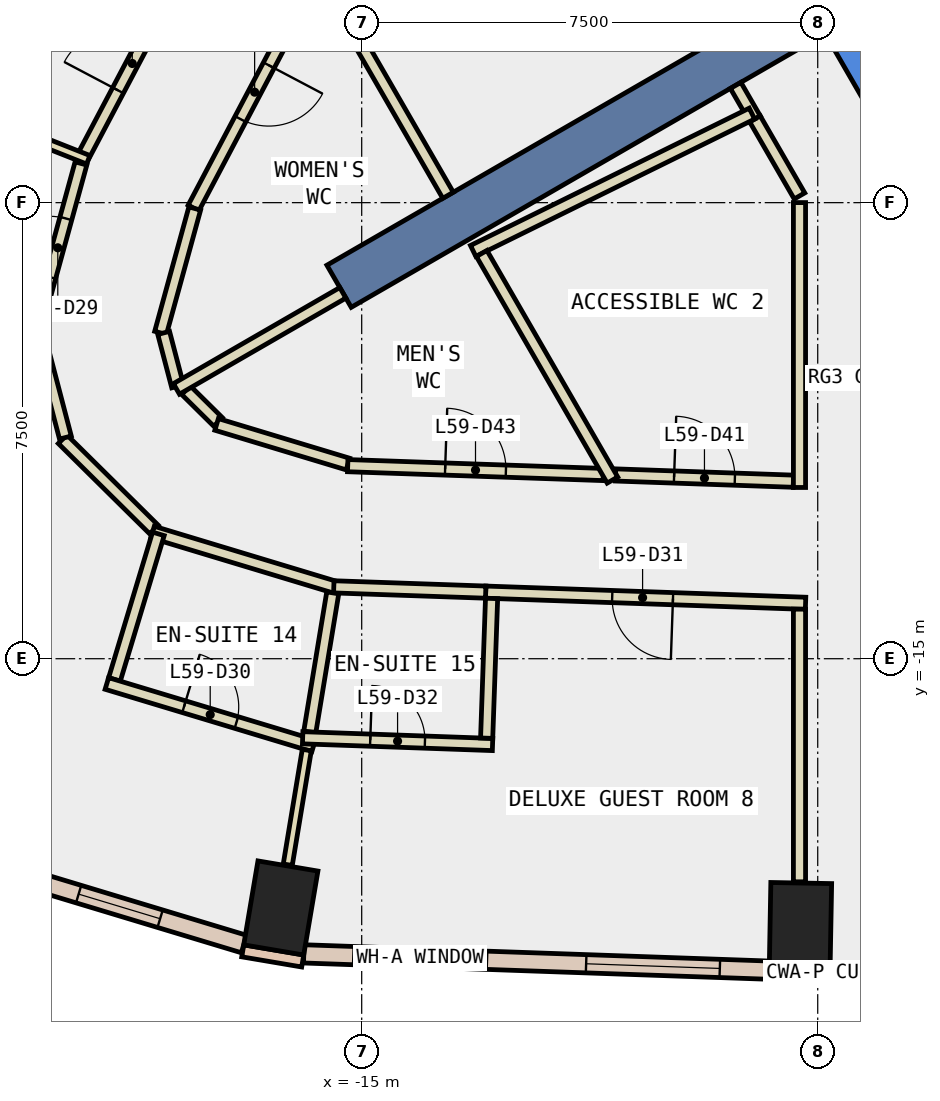
"""IFC4 building model, lengths in metres.
Left out: names, types, materials, properties, quantities, classifications, styles, units other than length and angle.
Written with IfcOpenShell. Run it as: python <this file> out.ifc"""

import sys

from ifc_helpers import new_model, si_unit, direction, frame, frame_2d, origin, origin_2d, place, context, subcontext, project, spatial, polyline, rectangle, outline, extrude, element, fill, save


model = new_model("IFC4")
c1 = context("Model", 3, precision=1e-05, world=origin(), true_north=direction((0.0, 1.0)))
c2 = subcontext(c1, "Body", "Model", "MODEL_VIEW")
j1 = project(units=[si_unit("LENGTHUNIT", "METRE"), si_unit("PLANEANGLEUNIT", "RADIAN")], contexts=[c1])
p1 = place(None, origin())
s1 = spatial("IfcSite", under=j1, at=p1, CompositionType="ELEMENT")
p2 = place(p1, origin())
s2 = spatial("IfcBuilding", under=s1, at=p2, CompositionType="ELEMENT")
p3 = place(p2, frame((0.0, 0.0, 259.4)))
s3 = spatial("IfcBuildingStorey", under=s2, at=p3, CompositionType="ELEMENT", Elevation=259.4)
for number, where, z_axis, x_axis in (
    (1, (-16.33, -19.099, -0.34), (0.0, 0.0, 1.0), (-0.986, 0.167, 0.0)),
    (2, (-7.784, -19.389, -0.34), (0.0, 0.0, 1.0), (-1.0, 0.018, 0.0)),
):
    element("IfcColumn", number, at=place(p3, frame(where, z_axis=z_axis, x_axis=x_axis)), inside=s3, PredefinedType="COLUMN", context=c2, shape_type="SweptSolid", body=[
        extrude(rectangle(XDim=1.0, YDim=1.4, at=origin_2d()), origin(), (0.0, 0.0, 1.0), 3.6),
    ])
p4 = place(p3, frame((0.0, 0.0, -0.34)))
e3 = element("IfcWall", 3, at=p4, inside=s3, PredefinedType="SHEAR", context=c2, shape_type="SweptSolid", body=[
    extrude(outline(polyline([(-11.547, 2.5), (-5.774, -7.5), (-5.427, -6.9), (-10.854, 2.5), (-11.547, 2.5)])), origin(), (0.0, 0.0, 1.0), 3.6),
])
p5 = place(p3, frame((-7.578, -4.375, -0.34), z_axis=(0.0, 0.0, 1.0), x_axis=(-0.866024315419, -0.5000018851, 0.0)))
e4 = element("IfcWall", 4, at=p5, inside=s3, PredefinedType="SHEAR", context=c2, shape_type="SweptSolid", body=[
    extrude(rectangle(XDim=9.0, YDim=0.8, at=frame_2d((4.5, 0.0))), origin(), (0.0, 0.0, 1.0), 3.6),
])
for number, where, z_axis, x_axis in (
    (5, (-16.956, -19.804, 0.0), (0.0, 0.0, 1.0), (0.986, -0.167, 0.0)),
    (6, (-8.298, -20.18, 0.0), (0.0, 0.0, 1.0), (1.0, -0.018, 0.0)),
):
    element("IfcWall", number, at=place(p3, frame(where, z_axis=z_axis, x_axis=x_axis)), inside=s3, PredefinedType="STANDARD", context=c2, shape_type="SweptSolid", body=[
        extrude(rectangle(XDim=1.0, YDim=0.2, at=frame_2d((0.5, 0.0))), origin(), (0.0, 0.0, 1.0), 3.26),
    ])
p6 = place(p3, frame((-15.952, -19.854, 0.0), z_axis=(0.0, 0.0, 1.0), x_axis=(0.999387577449, -0.034992428331, 0.0)))
e7 = element("IfcWall", 7, at=p6, inside=s3, PredefinedType="STANDARD", context=c2, shape_type="SweptSolid", body=[
    extrude(rectangle(XDim=7.661, YDim=0.3, at=frame_2d((3.83, 0.0))), origin(), (0.0, 0.0, 1.0), 3.26),
])
p7 = place(p6, frame((0.815, 0.0, 0.9)))
e8 = element("IfcOpeningElement", 8, at=p7, cuts=e7, PredefinedType="OPENING", context=c2, shape_type="SweptSolid", body=[
    extrude(rectangle(XDim=2.2, YDim=2.0, at=frame_2d((1.1, 1.0))), frame((0.0, 0.16, 0.0), z_axis=(0.0, -1.0, 0.0), x_axis=(1.0, 0.0, 0.0)), (0.0, 0.0, 1.0), 0.32),
])
p8 = place(p6, frame((4.646, 0.0, 0.9)))
e9 = element("IfcOpeningElement", 9, at=p8, cuts=e7, PredefinedType="OPENING", context=c2, shape_type="SweptSolid", body=[
    extrude(rectangle(XDim=2.2, YDim=2.0, at=frame_2d((1.1, 1.0))), frame((0.0, 0.16, 0.0), z_axis=(0.0, -1.0, 0.0), x_axis=(1.0, 0.0, 0.0)), (0.0, 0.0, 1.0), 0.32),
])
p9 = place(p3, frame((-21.034, -18.455, 0.0), z_axis=(0.0, 0.0, 1.0), x_axis=(0.957346168713, -0.288943442997, 0.0)))
e10 = element("IfcWall", 10, at=p9, inside=s3, PredefinedType="STANDARD", context=c2, shape_type="SweptSolid", body=[
    extrude(rectangle(XDim=4.281, YDim=0.3, at=frame_2d((2.14, 0.0))), origin(), (0.0, 0.0, 1.0), 3.26),
])
p10 = place(p9, frame((1.44, 0.0, 0.9)))
e11 = element("IfcOpeningElement", 11, at=p10, cuts=e10, PredefinedType="OPENING", context=c2, shape_type="SweptSolid", body=[
    extrude(rectangle(XDim=1.4, YDim=2.0, at=frame_2d((0.7, 1.0))), frame((0.0, 0.16, 0.0), z_axis=(0.0, -1.0, 0.0), x_axis=(1.0, 0.0, 0.0)), (0.0, 0.0, 1.0), 0.32),
])
p11 = place(p3, frame((-8.532, -6.123, 0.0), z_axis=(0.0, 0.0, 1.0), x_axis=(-0.499977104415, 0.866038622153, 0.0)))
e12 = element("IfcWall", 12, at=p11, inside=s3, PredefinedType="PARTITIONING", context=c2, shape_type="SweptSolid", body=[
    extrude(rectangle(XDim=0.636, YDim=0.2, at=frame_2d((0.318, 0.0))), origin(), (0.0, 0.0, 1.0), 3.26),
])
p12 = place(p3, frame((-7.8, -7.39, 0.0), z_axis=(0.0, 0.0, 1.0), x_axis=(-0.500266477503, 0.865871498253, 0.0)))
e13 = element("IfcWall", 13, at=p12, inside=s3, PredefinedType="PARTITIONING", context=c2, shape_type="SweptSolid", body=[
    extrude(rectangle(XDim=1.463, YDim=0.2, at=frame_2d((0.731, 0.0))), origin(), (0.0, 0.0, 1.0), 3.26),
])
p13 = place(p3, frame((-10.826, -11.978, 0.0), z_axis=(0.0, 0.0, 1.0), x_axis=(0.999380679818, -0.035188873332, 0.0)))
e14 = element("IfcWall", 14, at=p13, inside=s3, PredefinedType="PARTITIONING", context=c2, shape_type="SweptSolid", body=[
    extrude(rectangle(XDim=2.928, YDim=0.2, at=frame_2d((1.464, 0.0))), origin(), (0.0, 0.0, 1.0), 3.26),
])
p14 = place(p13, frame((0.964, 0.0, 0.0)))
e15 = element("IfcOpeningElement", 15, at=p14, cuts=e14, PredefinedType="OPENING", context=c2, shape_type="SweptSolid", body=[
    extrude(rectangle(XDim=1.0, YDim=2.1, at=frame_2d((0.5, 1.05))), frame((0.0, 0.11, 0.0), z_axis=(0.0, -1.0, 0.0), x_axis=(1.0, 0.0, 0.0)), (0.0, 0.0, 1.0), 0.22),
])
p15 = place(p3, frame((-15.756, -3.779, 0.0), z_axis=(0.0, 0.0, 1.0), x_axis=(-0.46672043873, -0.884404902786, 0.0)))
e16 = element("IfcWall", 16, at=p15, inside=s3, PredefinedType="PARTITIONING", context=c2, shape_type="SweptSolid", body=[
    extrude(rectangle(XDim=4.307, YDim=0.2, at=frame_2d((2.153, 0.0))), origin(), (0.0, 0.0, 1.0), 3.26),
])
p16 = place(p15, frame((1.653, 0.0, 0.0)))
e17 = element("IfcOpeningElement", 17, at=p16, cuts=e16, PredefinedType="OPENING", context=c2, shape_type="SweptSolid", body=[
    extrude(rectangle(XDim=1.0, YDim=2.1, at=frame_2d((0.5, 1.05))), frame((0.0, 0.11, 0.0), z_axis=(0.0, -1.0, 0.0), x_axis=(1.0, 0.0, 0.0)), (0.0, 0.0, 1.0), 0.22),
])
p17 = place(p3, frame((-17.746, -7.596, 0.0), z_axis=(0.0, 0.0, 1.0), x_axis=(-0.264859637197, -0.96428697626, 0.0)))
e18 = element("IfcWall", 18, at=p17, inside=s3, PredefinedType="PARTITIONING", context=c2, shape_type="SweptSolid", body=[
    extrude(rectangle(XDim=2.122, YDim=0.2, at=frame_2d((1.061, 0.0))), origin(), (0.0, 0.0, 1.0), 3.26),
])
p18 = place(p3, frame((-18.257, -9.642, 0.0), z_axis=(0.0, 0.0, 1.0), x_axis=(0.253407342366, -0.967359663639, 0.0)))
e19 = element("IfcWall", 19, at=p18, inside=s3, PredefinedType="PARTITIONING", context=c2, shape_type="SweptSolid", body=[
    extrude(rectangle(XDim=0.907, YDim=0.2, at=frame_2d((0.454, 0.0))), origin(), (0.0, 0.0, 1.0), 3.26),
])
p19 = place(p3, frame((-17.89, -10.584, 0.0), z_axis=(0.0, 0.0, 1.0), x_axis=(0.711042348586, -0.70314918653, 0.0)))
e20 = element("IfcWall", 20, at=p19, inside=s3, PredefinedType="PARTITIONING", context=c2, shape_type="SweptSolid", body=[
    extrude(rectangle(XDim=0.742, YDim=0.2, at=frame_2d((0.371, 0.0))), origin(), (0.0, 0.0, 1.0), 3.26),
])
p20 = place(p3, frame((-17.386, -11.147, 0.0), z_axis=(0.0, 0.0, 1.0), x_axis=(0.957321496956, -0.289025174451, 0.0)))
e21 = element("IfcWall", 21, at=p20, inside=s3, PredefinedType="PARTITIONING", context=c2, shape_type="SweptSolid", body=[
    extrude(rectangle(XDim=2.256, YDim=0.2, at=frame_2d((1.128, 0.0))), origin(), (0.0, 0.0, 1.0), 3.26),
])
p21 = place(p3, frame((-15.23, -11.825, 0.0), z_axis=(0.0, 0.0, 1.0), x_axis=(0.999397560436, -0.0347061406, 0.0)))
e22 = element("IfcWall", 22, at=p21, inside=s3, PredefinedType="PARTITIONING", context=c2, shape_type="SweptSolid", body=[
    extrude(rectangle(XDim=4.207, YDim=0.2, at=frame_2d((2.103, 0.0))), origin(), (0.0, 0.0, 1.0), 3.26),
])
p22 = place(p21, frame((1.603, 0.0, 0.0)))
e23 = element("IfcOpeningElement", 23, at=p22, cuts=e22, PredefinedType="OPENING", context=c2, shape_type="SweptSolid", body=[
    extrude(rectangle(XDim=1.0, YDim=2.1, at=frame_2d((0.5, 1.05))), frame((0.0, 0.11, 0.0), z_axis=(0.0, -1.0, 0.0), x_axis=(1.0, 0.0, 0.0)), (0.0, 0.0, 1.0), 0.22),
])
p23 = place(p3, frame((-19.602, -6.781, 0.0), z_axis=(0.0, 0.0, 1.0), x_axis=(0.466827780692, 0.884348247679, 0.0)))
e24 = element("IfcWall", 24, at=p23, inside=s3, PredefinedType="PARTITIONING", context=c2, shape_type="SweptSolid", body=[
    extrude(rectangle(XDim=3.451, YDim=0.2, at=frame_2d((1.726, 0.0))), origin(), (0.0, 0.0, 1.0), 3.26),
])
p24 = place(p23, frame((1.275, 0.0, 0.0)))
e25 = element("IfcOpeningElement", 25, at=p24, cuts=e24, PredefinedType="OPENING", context=c2, shape_type="SweptSolid", body=[
    extrude(rectangle(XDim=1.0, YDim=2.1, at=frame_2d((0.5, 1.05))), frame((0.0, 0.11, 0.0), z_axis=(0.0, -1.0, 0.0), x_axis=(1.0, 0.0, 0.0)), (0.0, 0.0, 1.0), 0.22),
])
p25 = place(p3, frame((-18.415, -12.877, 0.0), z_axis=(0.0, 0.0, 1.0), x_axis=(-0.711078065077, 0.70311306727, 0.0)))
e26 = element("IfcWall", 26, at=p25, inside=s3, PredefinedType="PARTITIONING", context=c2, shape_type="SweptSolid", body=[
    extrude(rectangle(XDim=2.115, YDim=0.2, at=frame_2d((1.058, 0.0))), origin(), (0.0, 0.0, 1.0), 3.26),
])
p26 = place(p3, frame((-19.873, -11.363, 0.0), z_axis=(0.0, 0.0, 1.0), x_axis=(-0.253192482031, 0.967415922467, 0.0)))
e27 = element("IfcWall", 27, at=p26, inside=s3, PredefinedType="PARTITIONING", context=c2, shape_type="SweptSolid", body=[
    extrude(rectangle(XDim=1.792, YDim=0.2, at=frame_2d((0.896, 0.0))), origin(), (0.0, 0.0, 1.0), 3.26),
])
p27 = place(p3, frame((-20.379, -9.629, 0.0), z_axis=(0.0, 0.0, 1.0), x_axis=(0.26487636938, 0.964282380293, 0.0)))
e28 = element("IfcWall", 28, at=p27, inside=s3, PredefinedType="PARTITIONING", context=c2, shape_type="SweptSolid", body=[
    extrude(rectangle(XDim=2.877, YDim=0.2, at=frame_2d((1.438, 0.0))), origin(), (0.0, 0.0, 1.0), 3.26),
])
p28 = place(p27, frame((0.938, 0.0, 0.0)))
e29 = element("IfcOpeningElement", 29, at=p28, cuts=e28, PredefinedType="OPENING", context=c2, shape_type="SweptSolid", body=[
    extrude(rectangle(XDim=1.0, YDim=2.1, at=frame_2d((0.5, 1.05))), frame((0.0, 0.11, 0.0), z_axis=(0.0, -1.0, 0.0), x_axis=(1.0, 0.0, 0.0)), (0.0, 0.0, 1.0), 0.22),
])
p29 = place(p3, frame((-15.363, -13.847, 0.0), z_axis=(0.0, 0.0, 1.0), x_axis=(-0.957320969561, 0.289026921303, 0.0)))
e30 = element("IfcWall", 30, at=p29, inside=s3, PredefinedType="PARTITIONING", context=c2, shape_type="SweptSolid", body=[
    extrude(rectangle(XDim=3.214, YDim=0.2, at=frame_2d((1.607, 0.0))), origin(), (0.0, 0.0, 1.0), 3.26),
])
p30 = place(p3, frame((-7.7, -14.089, 0.0), z_axis=(0.0, 0.0, 1.0), x_axis=(-0.999388410674, 0.034968623214, 0.0)))
e31 = element("IfcWall", 31, at=p30, inside=s3, PredefinedType="PARTITIONING", context=c2, shape_type="SweptSolid", body=[
    extrude(rectangle(XDim=5.264, YDim=0.2, at=frame_2d((2.632, 0.0))), origin(), (0.0, 0.0, 1.0), 3.26),
])
p31 = place(p30, frame((2.182, 0.0, 0.0)))
e32 = element("IfcOpeningElement", 32, at=p31, cuts=e31, PredefinedType="OPENING", context=c2, shape_type="SweptSolid", body=[
    extrude(rectangle(XDim=1.0, YDim=2.1, at=frame_2d((0.5, 1.05))), frame((0.0, 0.11, 0.0), z_axis=(0.0, -1.0, 0.0), x_axis=(1.0, 0.0, 0.0)), (0.0, 0.0, 1.0), 0.22),
])
p32 = place(p3, frame((-12.961, -13.905, 0.0), z_axis=(0.0, 0.0, 1.0), x_axis=(-0.999395279268, 0.034771766949, 0.0)))
e33 = element("IfcWall", 33, at=p32, inside=s3, PredefinedType="PARTITIONING", context=c2, shape_type="SweptSolid", body=[
    extrude(rectangle(XDim=2.5, YDim=0.2, at=frame_2d((1.25, 0.0))), origin(), (0.0, 0.0, 1.0), 3.26),
])
p33 = place(p3, frame((-7.8, -12.184, 0.0), z_axis=(0.0, 0.0, 1.0), x_axis=(0.0, 1.0, 0.0)))
e34 = element("IfcWall", 34, at=p33, inside=s3, PredefinedType="PARTITIONING", context=c2, shape_type="SweptSolid", body=[
    extrude(rectangle(XDim=4.685, YDim=0.2, at=frame_2d((2.343, 0.0))), origin(), (0.0, 0.0, 1.0), 3.26),
])
p34 = place(p3, frame((-7.8, -18.669, 0.0), z_axis=(0.0, 0.0, 1.0), x_axis=(0.0, 1.0, 0.0)))
e35 = element("IfcWall", 35, at=p34, inside=s3, PredefinedType="PARTITIONING", context=c2, shape_type="SweptSolid", body=[
    extrude(rectangle(XDim=4.484, YDim=0.2, at=frame_2d((2.242, 0.0))), origin(), (0.0, 0.0, 1.0), 3.26),
])
p35 = place(p3, frame((-8.582, -6.036, 0.0), z_axis=(0.0, 0.0, 1.0), x_axis=(-0.897105141673, -0.441817116897, 0.0)))
e36 = element("IfcWall", 36, at=p35, inside=s3, PredefinedType="PARTITIONING", context=c2, shape_type="SweptSolid", body=[
    extrude(rectangle(XDim=5.111, YDim=0.2, at=frame_2d((2.555, 0.0))), origin(), (0.0, 0.0, 1.0), 3.26),
])
p36 = place(p3, frame((-13.58, -7.379, 0.0), z_axis=(0.0, 0.0, 1.0), x_axis=(-0.499916403993, 0.866073662582, 0.0)))
e37 = element("IfcWall", 37, at=p36, inside=s3, PredefinedType="PARTITIONING", context=c2, shape_type="SweptSolid", body=[
    extrude(rectangle(XDim=4.359, YDim=0.2, at=frame_2d((2.179, 0.0))), origin(), (0.0, 0.0, 1.0), 3.26),
])
p37 = place(p3, frame((-10.876, -12.062, 0.0), z_axis=(0.0, 0.0, 1.0), x_axis=(-0.499977877545, 0.866038175813, 0.0)))
e38 = element("IfcWall", 38, at=p37, inside=s3, PredefinedType="PARTITIONING", context=c2, shape_type="SweptSolid", body=[
    extrude(rectangle(XDim=4.302, YDim=0.2, at=frame_2d((2.151, 0.0))), origin(), (0.0, 0.0, 1.0), 3.26),
])
p38 = place(p3, frame((-15.31, -8.983, 0.0), z_axis=(0.0, 0.0, 1.0), x_axis=(-0.866047943894, -0.499960957353, 0.0)))
e39 = element("IfcWall", 39, at=p38, inside=s3, PredefinedType="PARTITIONING", context=c2, shape_type="SweptSolid", body=[
    extrude(rectangle(XDim=3.16, YDim=0.2, at=frame_2d((1.58, 0.0))), origin(), (0.0, 0.0, 1.0), 3.26),
])
p39 = place(p3, frame((-19.497, -6.795, 0.0), z_axis=(0.0, 0.0, 1.0), x_axis=(-0.929826906887, 0.367997178289, 0.0)))
e40 = element("IfcWall", 40, at=p39, inside=s3, PredefinedType="PARTITIONING", context=c2, shape_type="SweptSolid", body=[
    extrude(rectangle(XDim=4.717, YDim=0.15, at=frame_2d((2.358, 0.0))), origin(), (0.0, 0.0, 1.0), 3.26),
])
p40 = place(p3, frame((-18.344, -12.947, 0.0), z_axis=(0.0, 0.0, 1.0), x_axis=(-0.288709122303, -0.957416859419, 0.0)))
e41 = element("IfcWall", 41, at=p40, inside=s3, PredefinedType="PARTITIONING", context=c2, shape_type="SweptSolid", body=[
    extrude(rectangle(XDim=2.5, YDim=0.2, at=frame_2d((1.25, 0.0))), origin(), (0.0, 0.0, 1.0), 3.26),
])
p41 = place(p3, frame((-19.191, -15.407, 0.0), z_axis=(0.0, 0.0, 1.0), x_axis=(0.957443200759, -0.28862175476, 0.0)))
e42 = element("IfcWall", 42, at=p41, inside=s3, PredefinedType="PARTITIONING", context=c2, shape_type="SweptSolid", body=[
    extrude(rectangle(XDim=3.551, YDim=0.2, at=frame_2d((1.775, 0.0))), origin(), (0.0, 0.0, 1.0), 3.26),
])
p42 = place(p41, frame((1.325, 0.0, 0.0)))
e43 = element("IfcOpeningElement", 43, at=p42, cuts=e42, PredefinedType="OPENING", context=c2, shape_type="SweptSolid", body=[
    extrude(rectangle(XDim=0.9, YDim=2.1, at=frame_2d((0.45, 1.05))), frame((0.0, 0.11, 0.0), z_axis=(0.0, -1.0, 0.0), x_axis=(1.0, 0.0, 0.0)), (0.0, 0.0, 1.0), 0.22),
])
p43 = place(p3, frame((-15.903, -16.502, 0.0), z_axis=(0.0, 0.0, 1.0), x_axis=(-0.163715562906, -0.986507584594, 0.0)))
e44 = element("IfcWall", 44, at=p43, inside=s3, PredefinedType="PARTITIONING", context=c2, shape_type="SweptSolid", body=[
    extrude(rectangle(XDim=1.912, YDim=0.15, at=frame_2d((0.956, 0.0))), origin(), (0.0, 0.0, 1.0), 3.26),
])
p44 = place(p3, frame((-15.476, -13.917, 0.0), z_axis=(0.0, 0.0, 1.0), x_axis=(-0.162964805234, -0.986631882849, 0.0)))
e45 = element("IfcWall", 45, at=p44, inside=s3, PredefinedType="PARTITIONING", context=c2, shape_type="SweptSolid", body=[
    extrude(rectangle(XDim=2.319, YDim=0.2, at=frame_2d((1.16, 0.0))), origin(), (0.0, 0.0, 1.0), 3.26),
])
p45 = place(p3, frame((-15.971, -16.3, 0.0), z_axis=(0.0, 0.0, 1.0), x_axis=(0.999370791233, -0.035468600627, 0.0)))
e46 = element("IfcWall", 46, at=p45, inside=s3, PredefinedType="PARTITIONING", context=c2, shape_type="SweptSolid", body=[
    extrude(rectangle(XDim=3.125, YDim=0.2, at=frame_2d((1.562, 0.0))), origin(), (0.0, 0.0, 1.0), 3.26),
])
p46 = place(p45, frame((1.112, 0.0, 0.0)))
e47 = element("IfcOpeningElement", 47, at=p46, cuts=e46, PredefinedType="OPENING", context=c2, shape_type="SweptSolid", body=[
    extrude(rectangle(XDim=0.9, YDim=2.1, at=frame_2d((0.45, 1.05))), frame((0.0, 0.11, 0.0), z_axis=(0.0, -1.0, 0.0), x_axis=(1.0, 0.0, 0.0)), (0.0, 0.0, 1.0), 0.22),
])
p47 = place(p3, frame((-12.945, -16.307, 0.0), z_axis=(0.0, 0.0, 1.0), x_axis=(0.035252193458, 0.999378448265, 0.0)))
e48 = element("IfcWall", 48, at=p47, inside=s3, PredefinedType="PARTITIONING", context=c2, shape_type="SweptSolid", body=[
    extrude(rectangle(XDim=2.299, YDim=0.2, at=frame_2d((1.15, 0.0))), origin(), (0.0, 0.0, 1.0), 3.26),
])
p48 = place(p7, origin())
e49 = element("IfcWindow", 49, at=p48, inside=s3, PartitioningType="SINGLE_PANEL", PredefinedType="WINDOW", context=c2, shape_type="SweptSolid", body=[
    extrude(rectangle(XDim=2.2, YDim=2.0, at=frame_2d((1.1, 1.0))), frame((0.0, 0.03, 0.0), z_axis=(0.0, -1.0, 0.0), x_axis=(1.0, 0.0, 0.0)), (0.0, 0.0, 1.0), 0.06),
])
fill(e8, e49)
p49 = place(p8, origin())
e50 = element("IfcWindow", 50, at=p49, inside=s3, PartitioningType="SINGLE_PANEL", PredefinedType="WINDOW", context=c2, shape_type="SweptSolid", body=[
    extrude(rectangle(XDim=2.2, YDim=2.0, at=frame_2d((1.1, 1.0))), frame((0.0, 0.03, 0.0), z_axis=(0.0, -1.0, 0.0), x_axis=(1.0, 0.0, 0.0)), (0.0, 0.0, 1.0), 0.06),
])
fill(e9, e50)
p50 = place(p10, origin())
e51 = element("IfcWindow", 51, at=p50, inside=s3, PartitioningType="SINGLE_PANEL", PredefinedType="WINDOW", context=c2, shape_type="SweptSolid", body=[
    extrude(rectangle(XDim=1.4, YDim=2.0, at=frame_2d((0.7, 1.0))), frame((0.0, 0.03, 0.0), z_axis=(0.0, -1.0, 0.0), x_axis=(1.0, 0.0, 0.0)), (0.0, 0.0, 1.0), 0.06),
])
fill(e11, e51)
p51 = place(p24, origin())
e52 = element("IfcDoor", 52, at=p51, inside=s3, OperationType="SINGLE_SWING_LEFT", PredefinedType="DOOR", context=c2, shape_type="SweptSolid", body=[
    extrude(rectangle(XDim=1.0, YDim=2.1, at=frame_2d((0.5, 1.05))), frame((0.0, 0.025, 0.0), z_axis=(0.0, -1.0, 0.0), x_axis=(1.0, 0.0, 0.0)), (0.0, 0.0, 1.0), 0.05),
])
fill(e25, e52)
p52 = place(p28, origin())
e53 = element("IfcDoor", 53, at=p52, inside=s3, OperationType="SINGLE_SWING_LEFT", PredefinedType="DOOR", context=c2, shape_type="SweptSolid", body=[
    extrude(rectangle(XDim=1.0, YDim=2.1, at=frame_2d((0.5, 1.05))), frame((0.0, 0.025, 0.0), z_axis=(0.0, -1.0, 0.0), x_axis=(1.0, 0.0, 0.0)), (0.0, 0.0, 1.0), 0.05),
])
fill(e29, e53)
p53 = place(p42, origin())
e54 = element("IfcDoor", 54, at=p53, inside=s3, OperationType="SINGLE_SWING_LEFT", PredefinedType="DOOR", context=c2, shape_type="SweptSolid", body=[
    extrude(rectangle(XDim=0.9, YDim=2.1, at=frame_2d((0.45, 1.05))), frame((0.0, 0.025, 0.0), z_axis=(0.0, -1.0, 0.0), x_axis=(1.0, 0.0, 0.0)), (0.0, 0.0, 1.0), 0.05),
])
fill(e43, e54)
p54 = place(p31, origin())
e55 = element("IfcDoor", 55, at=p54, inside=s3, OperationType="SINGLE_SWING_LEFT", PredefinedType="DOOR", context=c2, shape_type="SweptSolid", body=[
    extrude(rectangle(XDim=1.0, YDim=2.1, at=frame_2d((0.5, 1.05))), frame((0.0, 0.025, 0.0), z_axis=(0.0, -1.0, 0.0), x_axis=(1.0, 0.0, 0.0)), (0.0, 0.0, 1.0), 0.05),
])
fill(e32, e55)
p55 = place(p46, origin())
e56 = element("IfcDoor", 56, at=p55, inside=s3, OperationType="SINGLE_SWING_LEFT", PredefinedType="DOOR", context=c2, shape_type="SweptSolid", body=[
    extrude(rectangle(XDim=0.9, YDim=2.1, at=frame_2d((0.45, 1.05))), frame((0.0, 0.025, 0.0), z_axis=(0.0, -1.0, 0.0), x_axis=(1.0, 0.0, 0.0)), (0.0, 0.0, 1.0), 0.05),
])
fill(e47, e56)
p56 = place(p14, origin())
e57 = element("IfcDoor", 57, at=p56, inside=s3, OperationType="SINGLE_SWING_LEFT", PredefinedType="DOOR", context=c2, shape_type="SweptSolid", body=[
    extrude(rectangle(XDim=1.0, YDim=2.1, at=frame_2d((0.5, 1.05))), frame((0.0, 0.025, 0.0), z_axis=(0.0, -1.0, 0.0), x_axis=(1.0, 0.0, 0.0)), (0.0, 0.0, 1.0), 0.05),
])
fill(e15, e57)
p57 = place(p16, origin())
e58 = element("IfcDoor", 58, at=p57, inside=s3, OperationType="SINGLE_SWING_LEFT", PredefinedType="DOOR", context=c2, shape_type="SweptSolid", body=[
    extrude(rectangle(XDim=1.0, YDim=2.1, at=frame_2d((0.5, 1.05))), frame((0.0, 0.025, 0.0), z_axis=(0.0, -1.0, 0.0), x_axis=(1.0, 0.0, 0.0)), (0.0, 0.0, 1.0), 0.05),
])
fill(e17, e58)
p58 = place(p22, origin())
e59 = element("IfcDoor", 59, at=p58, inside=s3, OperationType="SINGLE_SWING_LEFT", PredefinedType="DOOR", context=c2, shape_type="SweptSolid", body=[
    extrude(rectangle(XDim=1.0, YDim=2.1, at=frame_2d((0.5, 1.05))), frame((0.0, 0.025, 0.0), z_axis=(0.0, -1.0, 0.0), x_axis=(1.0, 0.0, 0.0)), (0.0, 0.0, 1.0), 0.05),
])
fill(e23, e59)
save(model, sys.argv[1])
